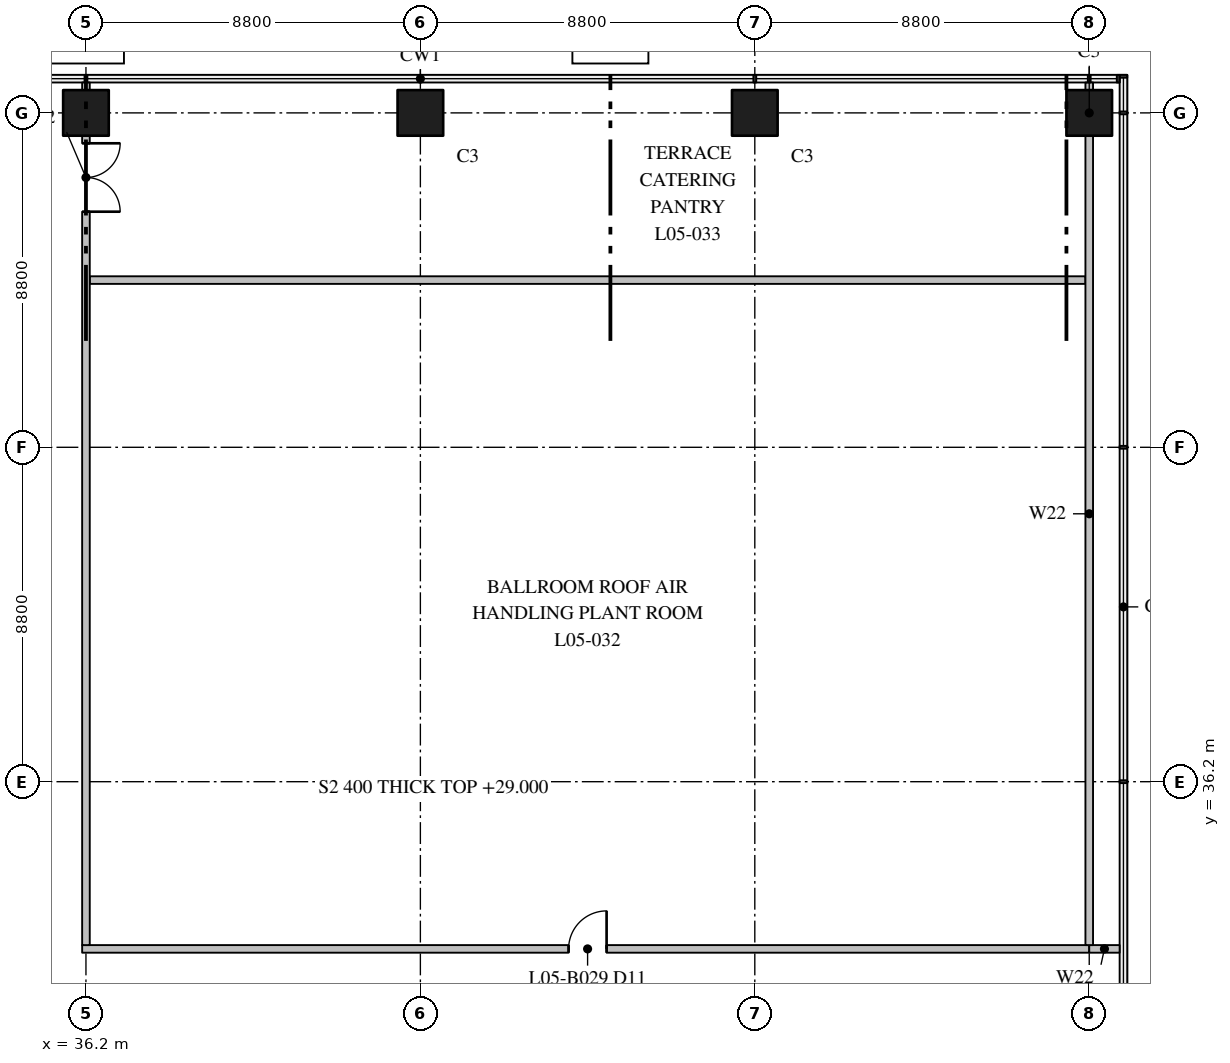
"""IFC4 building model, lengths in metres.
Left out: names, types, materials, properties, quantities, classifications, styles, units other than length and angle.
Written with IfcOpenShell. Run it as: python <this file> out.ifc"""

import sys

from ifc_helpers import new_model, si_unit, direction, frame, frame_2d, origin, origin_2d, place, context, subcontext, project, spatial, rectangle, extrude, element, fill, save


model = new_model("IFC4")
c1 = context("Model", 3, precision=1e-05, world=origin(), true_north=direction((0.0, 1.0)))
c2 = subcontext(c1, "Body", "Model", "MODEL_VIEW")
j1 = project(units=[si_unit("LENGTHUNIT", "METRE"), si_unit("PLANEANGLEUNIT", "RADIAN")], contexts=[c1])
p1 = place(None, origin())
s1 = spatial("IfcSite", under=j1, at=p1, CompositionType="ELEMENT")
p2 = place(p1, origin())
s2 = spatial("IfcBuilding", under=s1, at=p2, CompositionType="ELEMENT")
p3 = place(p2, frame((0.0, 0.0, 29.0)))
s3 = spatial("IfcBuildingStorey", under=s2, at=p3, CompositionType="ELEMENT", Elevation=29.0)
for number, where, z_axis, x_axis in (
    (1, (36.2, 53.8, 0.0), (0.0, 0.0, 1.0), (1.0, 0.0, 0.0)),
    (2, (45.0, 53.8, 0.0), (0.0, 0.0, 1.0), (1.0, 0.0, 0.0)),
    (3, (53.8, 53.8, 0.0), (0.0, 0.0, 1.0), (1.0, 0.0, 0.0)),
    (4, (62.6, 53.8, 0.0), (0.0, 0.0, 1.0), (1.0, 0.0, 0.0)),
):
    element("IfcColumn", number, at=place(p3, frame(where, z_axis=z_axis, x_axis=x_axis)), inside=s3, PredefinedType="COLUMN", context=c2, shape_type="SweptSolid", body=[
        extrude(rectangle(XDim=1.2, YDim=1.2, at=origin_2d()), origin(), (0.0, 0.0, 1.0), 5.0),
    ])
p4 = place(p3, frame((36.1, 31.8, 0.0), z_axis=(0.0, 0.0, 1.0), x_axis=(1.0, 0.0, 0.0)))
e5 = element("IfcWall", 5, at=p4, inside=s3, PredefinedType="PARTITIONING", context=c2, shape_type="SweptSolid", body=[
    extrude(rectangle(XDim=26.5, YDim=0.2, at=frame_2d((13.25, 0.0))), origin(), (0.0, 0.0, 1.0), 4.55),
])
p5 = place(p4, frame((12.8, 0.0, 0.0)))
e6 = element("IfcOpeningElement", 6, at=p5, cuts=e5, PredefinedType="OPENING", context=c2, shape_type="SweptSolid", body=[
    extrude(rectangle(XDim=1.0, YDim=2.1, at=frame_2d((0.5, 1.05))), frame((0.0, 0.11, 0.0), z_axis=(0.0, -1.0, 0.0), x_axis=(1.0, 0.0, 0.0)), (0.0, 0.0, 1.0), 0.22),
])
p6 = place(p3, frame((62.6, 31.8, 0.0), z_axis=(0.0, 0.0, 1.0), x_axis=(1.0, 0.0, 0.0)))
e7 = element("IfcWall", 7, at=p6, inside=s3, PredefinedType="PARTITIONING", context=c2, shape_type="SweptSolid", body=[
    extrude(rectangle(XDim=0.8, YDim=0.2, at=frame_2d((0.4, 0.0))), origin(), (0.0, 0.0, 1.0), 4.55),
])
p7 = place(p3, frame((36.3, 49.4, 0.0), z_axis=(0.0, 0.0, 1.0), x_axis=(1.0, 0.0, 0.0)))
e8 = element("IfcWall", 8, at=p7, inside=s3, PredefinedType="PARTITIONING", context=c2, shape_type="SweptSolid", body=[
    extrude(rectangle(XDim=26.2, YDim=0.2, at=frame_2d((13.1, 0.0))), origin(), (0.0, 0.0, 1.0), 4.55),
])
p8 = place(p3, frame((36.2, 31.9, 0.0), z_axis=(0.0, 0.0, 1.0), x_axis=(0.0, 1.0, 0.0)))
e9 = element("IfcWall", 9, at=p8, inside=s3, PredefinedType="PARTITIONING", context=c2, shape_type="SweptSolid", body=[
    extrude(rectangle(XDim=22.7, YDim=0.2, at=frame_2d((11.35, 0.0))), origin(), (0.0, 0.0, 1.0), 4.55),
])
p9 = place(p8, frame((19.3, 0.0, 0.0)))
e10 = element("IfcOpeningElement", 10, at=p9, cuts=e9, PredefinedType="OPENING", context=c2, shape_type="SweptSolid", body=[
    extrude(rectangle(XDim=1.8, YDim=2.1, at=frame_2d((0.9, 1.05))), frame((0.0, 0.11, 0.0), z_axis=(0.0, -1.0, 0.0), x_axis=(1.0, 0.0, 0.0)), (0.0, 0.0, 1.0), 0.22),
])
p10 = place(p3, frame((62.6, 31.9, 0.0), z_axis=(0.0, 0.0, 1.0), x_axis=(0.0, 1.0, 0.0)))
e11 = element("IfcWall", 11, at=p10, inside=s3, PredefinedType="PARTITIONING", context=c2, shape_type="SweptSolid", body=[
    extrude(rectangle(XDim=22.7, YDim=0.2, at=frame_2d((11.35, 0.0))), origin(), (0.0, 0.0, 1.0), 4.55),
])
p11 = place(p5, origin())
e12 = element("IfcDoor", 12, at=p11, inside=s3, OperationType="SINGLE_SWING_RIGHT", PredefinedType="DOOR", context=c2, shape_type="SweptSolid", body=[
    extrude(rectangle(XDim=1.0, YDim=2.1, at=frame_2d((0.5, 1.05))), frame((0.0, 0.025, 0.0), z_axis=(0.0, -1.0, 0.0), x_axis=(1.0, 0.0, 0.0)), (0.0, 0.0, 1.0), 0.05),
])
fill(e6, e12)
p12 = place(p9, frame((1.8, 0.0, 0.0), z_axis=(0.0, 0.0, 1.0), x_axis=(-1.0, 0.0, 0.0)))
e13 = element("IfcDoor", 13, at=p12, inside=s3, OperationType="DOUBLE_DOOR_SINGLE_SWING", PredefinedType="DOOR", context=c2, shape_type="SweptSolid", body=[
    extrude(rectangle(XDim=1.8, YDim=2.1, at=frame_2d((0.9, 1.05))), frame((0.0, 0.025, 0.0), z_axis=(0.0, -1.0, 0.0), x_axis=(1.0, 0.0, 0.0)), (0.0, 0.0, 1.0), 0.05),
])
fill(e10, e13)
save(model, sys.argv[1])
